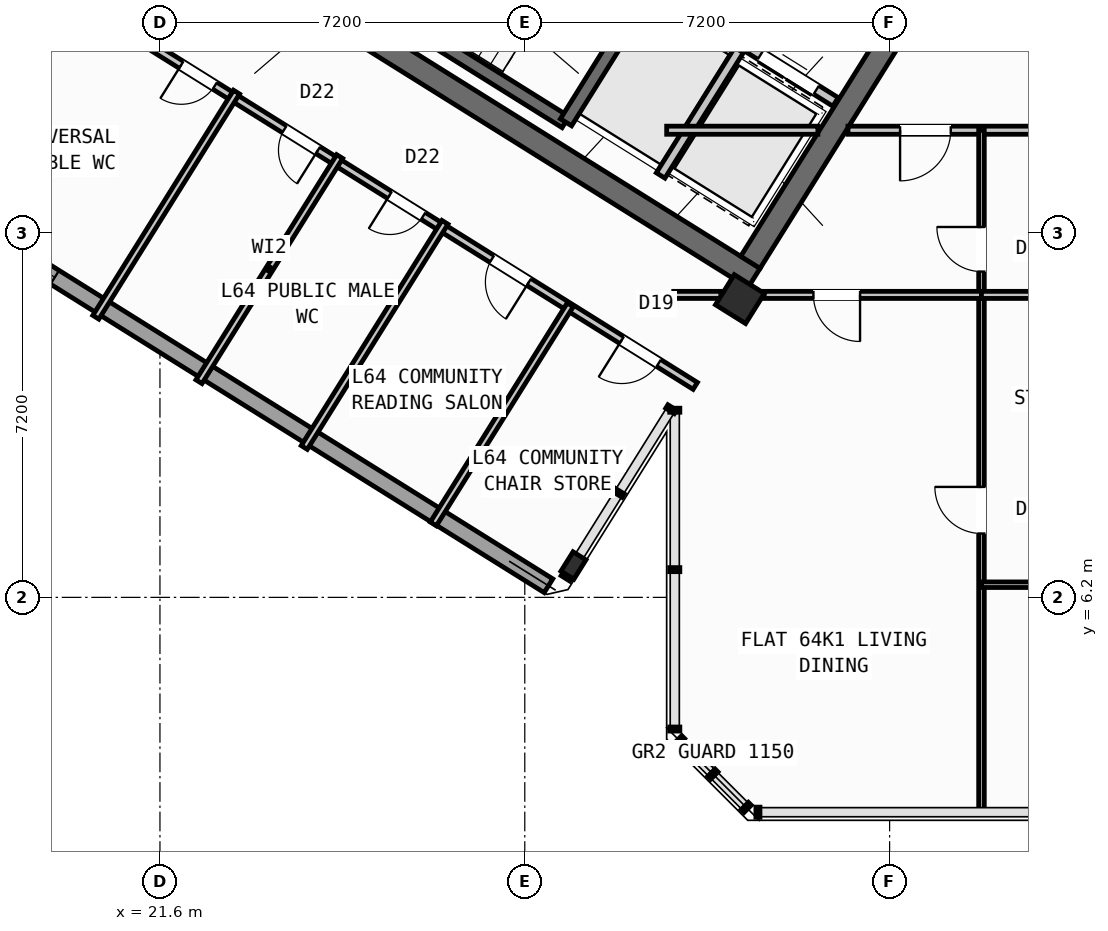
"""IFC4 building model, lengths in metres.
Left out: names, types, materials, properties, quantities, classifications, styles, units other than length and angle.
Written with IfcOpenShell. Run it as: python <this file> out.ifc"""

import sys

from ifc_helpers import new_model, si_unit, direction, frame, frame_2d, origin, origin_2d, place, context, subcontext, project, spatial, rectangle, hollow_rectangle, i_section, extrude, source, transform, mapped, element, fill, save


model = new_model("IFC4")
c1 = context("Model", 3, precision=1e-05, world=origin(), true_north=direction((0.0, 1.0)))
c2 = subcontext(c1, "Body", "Model", "MODEL_VIEW")
j1 = project(units=[si_unit("LENGTHUNIT", "METRE"), si_unit("PLANEANGLEUNIT", "RADIAN")], contexts=[c1])
p1 = place(None, origin())
s1 = spatial("IfcSite", under=j1, at=p1, CompositionType="ELEMENT")
p2 = place(p1, origin())
s2 = spatial("IfcBuilding", under=s1, at=p2, CompositionType="ELEMENT")
p3 = place(p2, frame((0.0, 0.0, 254.7)))
s3 = spatial("IfcBuildingStorey", under=s2, at=p3, CompositionType="ELEMENT", Elevation=254.7)
p4 = place(p3, frame((33.324, 12.503, 0.0), z_axis=(0.0, 0.0, 1.0), x_axis=(-0.848043529849, 0.529926571782, 0.0)))
e1 = element("IfcWall", 1, at=p4, inside=s3, PredefinedType="SHEAR", context=c2, shape_type="SweptSolid", body=[
    extrude(rectangle(XDim=13.04, YDim=0.45, at=frame_2d((6.52, 0.0))), origin(), (0.0, 0.0, 1.0), 4.25),
])
p5 = place(p3, frame((36.683, 18.304, 0.0), z_axis=(0.0, 0.0, 1.0), x_axis=(-0.529904039071, -0.848057609704, 0.0)))
e2 = element("IfcWall", 2, at=p5, inside=s3, PredefinedType="SHEAR", context=c2, shape_type="SweptSolid", body=[
    extrude(rectangle(XDim=6.475, YDim=0.45, at=frame_2d((3.238, 0.0))), origin(), (0.0, 0.0, 1.0), 4.25),
])
m1 = source(origin(), c2, "Body", "SweptSolid", [
    extrude(hollow_rectangle(XDim=0.7, YDim=0.7, WallThickness=0.028, at=origin_2d()), origin(), (0.0, 0.0, 1.0), 4.5),
])
p6 = place(p3, frame((33.046, 12.087, 0.0), z_axis=(0.0, 0.0, 1.0), x_axis=(-0.848048096156, 0.529919264233, 0.0)))
e3 = element("IfcColumn", 3, at=p6, inside=s3, PredefinedType="COLUMN", context=c2, shape_type="MappedRepresentation", body=[
    mapped(m1, transform((0.0, 0.0, 0.0), scale=1.0)),
])
m2 = source(origin(), c2, "Body", "SweptSolid", [
    extrude(i_section(OverallWidth=0.3, OverallDepth=0.45, WebThickness=0.014, FlangeThickness=0.026, at=origin_2d()), origin(), (0.0, 0.0, 1.0), 4.5),
])
p7 = place(p3, frame((29.761, 6.829, 0.0), z_axis=(0.0, 0.0, 1.0), x_axis=(-0.848048096156, 0.529919264233, 0.0)))
e4 = element("IfcColumn", 4, at=p7, inside=s3, PredefinedType="COLUMN", context=c2, shape_type="MappedRepresentation", body=[
    mapped(m2, transform((0.0, 0.0, 0.0), scale=1.0)),
])
p8 = place(p3, frame((29.268, 6.429, 0.0), z_axis=(0.0, 0.0, 1.0), x_axis=(-0.848049971435, 0.529916263149, 0.0)))
e5 = element("IfcWall", 5, at=p8, inside=s3, PredefinedType="STANDARD", context=c2, shape_type="SweptSolid", body=[
    extrude(rectangle(XDim=31.588, YDim=0.32, at=frame_2d((15.794, 0.0))), origin(), (0.0, 0.0, 1.0), 4.25),
])
p9 = place(p8, frame((22.349, 0.0, 0.0)))
e6 = element("IfcOpeningElement", 6, at=p9, cuts=e5, PredefinedType="OPENING", context=c2, shape_type="SweptSolid", body=[
    extrude(rectangle(XDim=1.2, YDim=2.15, at=frame_2d((0.6, 1.075))), frame((0.0, 0.17, 0.0), z_axis=(0.0, -1.0, 0.0), x_axis=(1.0, 0.0, 0.0)), (0.0, 0.0, 1.0), 0.34),
])
p10 = place(p8, frame((11.489, 0.0, 0.7)))
e7 = element("IfcOpeningElement", 7, at=p10, cuts=e5, PredefinedType="OPENING", context=c2, shape_type="SweptSolid", body=[
    extrude(rectangle(XDim=2.6, YDim=2.0, at=frame_2d((1.3, 1.0))), frame((0.0, 0.17, 0.0), z_axis=(0.0, -1.0, 0.0), x_axis=(1.0, 0.0, 0.0)), (0.0, 0.0, 1.0), 0.34),
])
p11 = place(p8, frame((17.881, 0.0, 0.75)))
e8 = element("IfcOpeningElement", 8, at=p11, cuts=e5, PredefinedType="OPENING", context=c2, shape_type="SweptSolid", body=[
    extrude(rectangle(XDim=2.0, YDim=1.95, at=frame_2d((1.0, 0.975))), frame((0.0, 0.17, 0.0), z_axis=(0.0, -1.0, 0.0), x_axis=(1.0, 0.0, 0.0)), (0.0, 0.0, 1.0), 0.34),
])
p12 = place(p8, frame((25.501, 0.0, 0.85)))
e9 = element("IfcOpeningElement", 9, at=p12, cuts=e5, PredefinedType="OPENING", context=c2, shape_type="SweptSolid", body=[
    extrude(rectangle(XDim=1.6, YDim=1.8, at=frame_2d((0.8, 0.9))), frame((0.0, 0.17, 0.0), z_axis=(0.0, -1.0, 0.0), x_axis=(1.0, 0.0, 0.0)), (0.0, 0.0, 1.0), 0.34),
])
p13 = place(p8, frame((28.725, 0.0, 0.85)))
e10 = element("IfcOpeningElement", 10, at=p13, cuts=e5, PredefinedType="OPENING", context=c2, shape_type="SweptSolid", body=[
    extrude(rectangle(XDim=1.6, YDim=1.8, at=frame_2d((0.8, 0.9))), frame((0.0, 0.17, 0.0), z_axis=(0.0, -1.0, 0.0), x_axis=(1.0, 0.0, 0.0)), (0.0, 0.0, 1.0), 0.34),
])
p14 = place(p3, frame((29.605, 15.581, 0.0), z_axis=(0.0, 0.0, 1.0), x_axis=(-0.848036911448, 0.529937163087, 0.0)))
e11 = element("IfcWall", 11, at=p14, inside=s3, PredefinedType="SHEAR", context=c2, shape_type="SweptSolid", body=[
    extrude(rectangle(XDim=7.46, YDim=0.26, at=frame_2d((3.73, 0.0))), origin(), (0.0, 0.0, 1.0), 4.25),
])
p15 = place(p3, frame((31.288, 18.256, 0.0), z_axis=(0.0, 0.0, 1.0), x_axis=(-0.529943379326, -0.848033026897, 0.0)))
e12 = element("IfcWall", 12, at=p15, inside=s3, PredefinedType="SHEAR", context=c2, shape_type="SweptSolid", body=[
    extrude(rectangle(XDim=3.16, YDim=0.26, at=frame_2d((1.58, 0.0))), origin(), (0.0, 0.0, 1.0), 4.25),
])
p16 = place(p3, frame((34.933, 15.978, 0.0), z_axis=(0.0, 0.0, 1.0), x_axis=(-0.848055739377, 0.529907032327, 0.0)))
e13 = element("IfcWall", 13, at=p16, inside=s3, PredefinedType="STANDARD", context=c2, shape_type="SweptSolid", body=[
    extrude(rectangle(XDim=4.298, YDim=0.2, at=frame_2d((2.149, 0.0))), origin(), (0.0, 0.0, 1.0), 4.24),
])
p17 = place(p16, frame((0.448, 0.0, 0.0)))
e14 = element("IfcOpeningElement", 14, at=p17, cuts=e13, PredefinedType="OPENING", context=c2, shape_type="SweptSolid", body=[
    extrude(rectangle(XDim=1.3, YDim=2.2, at=frame_2d((0.65, 1.1))), frame((0.0, 0.11, 0.0), z_axis=(0.0, -1.0, 0.0), x_axis=(1.0, 0.0, 0.0)), (0.0, 0.0, 1.0), 0.22),
])
p18 = place(p16, frame((2.523, 0.0, 0.0)))
e15 = element("IfcOpeningElement", 15, at=p18, cuts=e13, PredefinedType="OPENING", context=c2, shape_type="SweptSolid", body=[
    extrude(rectangle(XDim=1.45, YDim=2.25, at=frame_2d((0.725, 1.125))), frame((0.0, 0.11, 0.0), z_axis=(0.0, -1.0, 0.0), x_axis=(1.0, 0.0, 0.0)), (0.0, 0.0, 1.0), 0.22),
])
p19 = place(p3, frame((33.029, 17.003, 0.0), z_axis=(0.0, 0.0, 1.0), x_axis=(-0.529916267533, -0.848049968695, 0.0)))
e16 = element("IfcWall", 16, at=p19, inside=s3, PredefinedType="STANDARD", context=c2, shape_type="SweptSolid", body=[
    extrude(rectangle(XDim=2.92, YDim=0.2, at=frame_2d((1.46, 0.0))), origin(), (0.0, 0.0, 1.0), 4.24),
])
p20 = place(p3, frame((20.719, 21.44, 0.0), z_axis=(0.0, 0.0, 1.0), x_axis=(-0.529906246318, -0.848056230514, 0.0)))
e17 = element("IfcWall", 17, at=p20, inside=s3, PredefinedType="PARTITIONING", context=c2, shape_type="SweptSolid", body=[
    extrude(rectangle(XDim=8.05, YDim=0.16, at=frame_2d((4.025, 0.0))), origin(), (0.0, 0.0, 1.0), 4.24),
])
p21 = place(p3, frame((32.164, 10.374, 0.0), z_axis=(0.0, 0.0, 1.0), x_axis=(-0.848044107957, 0.529925646633, 0.0)))
e18 = element("IfcWall", 18, at=p21, inside=s3, PredefinedType="PARTITIONING", context=c2, shape_type="SweptSolid", body=[
    extrude(rectangle(XDim=15.57, YDim=0.16, at=frame_2d((7.785, 0.0))), origin(), (0.0, 0.0, 1.0), 4.24),
])
p22 = place(p21, frame((0.85, 0.0, 0.0)))
e19 = element("IfcOpeningElement", 19, at=p22, cuts=e18, PredefinedType="OPENING", context=c2, shape_type="SweptSolid", body=[
    extrude(rectangle(XDim=0.86, YDim=2.05, at=frame_2d((0.43, 1.025))), frame((0.0, 0.09, 0.0), z_axis=(0.0, -1.0, 0.0), x_axis=(1.0, 0.0, 0.0)), (0.0, 0.0, 1.0), 0.18),
])
p23 = place(p21, frame((3.87, 0.0, 0.0)))
e20 = element("IfcOpeningElement", 20, at=p23, cuts=e18, PredefinedType="OPENING", context=c2, shape_type="SweptSolid", body=[
    extrude(rectangle(XDim=0.86, YDim=2.05, at=frame_2d((0.43, 1.025))), frame((0.0, 0.09, 0.0), z_axis=(0.0, -1.0, 0.0), x_axis=(1.0, 0.0, 0.0)), (0.0, 0.0, 1.0), 0.18),
])
p24 = place(p21, frame((6.33, 0.0, 0.0)))
e21 = element("IfcOpeningElement", 21, at=p24, cuts=e18, PredefinedType="OPENING", context=c2, shape_type="SweptSolid", body=[
    extrude(rectangle(XDim=0.78, YDim=2.05, at=frame_2d((0.39, 1.025))), frame((0.0, 0.09, 0.0), z_axis=(0.0, -1.0, 0.0), x_axis=(1.0, 0.0, 0.0)), (0.0, 0.0, 1.0), 0.18),
])
p25 = place(p21, frame((8.78, 0.0, 0.0)))
e22 = element("IfcOpeningElement", 22, at=p25, cuts=e18, PredefinedType="OPENING", context=c2, shape_type="SweptSolid", body=[
    extrude(rectangle(XDim=0.78, YDim=2.05, at=frame_2d((0.39, 1.025))), frame((0.0, 0.09, 0.0), z_axis=(0.0, -1.0, 0.0), x_axis=(1.0, 0.0, 0.0)), (0.0, 0.0, 1.0), 0.18),
])
p26 = place(p21, frame((11.18, 0.0, 0.0)))
e23 = element("IfcOpeningElement", 23, at=p26, cuts=e18, PredefinedType="OPENING", context=c2, shape_type="SweptSolid", body=[
    extrude(rectangle(XDim=0.78, YDim=2.05, at=frame_2d((0.39, 1.025))), frame((0.0, 0.09, 0.0), z_axis=(0.0, -1.0, 0.0), x_axis=(1.0, 0.0, 0.0)), (0.0, 0.0, 1.0), 0.18),
])
p27 = place(p3, frame((29.698, 11.974, 0.0), z_axis=(0.0, 0.0, 1.0), x_axis=(-0.529899964172, -0.848060155868, 0.0)))
e24 = element("IfcWall", 24, at=p27, inside=s3, PredefinedType="PLUMBINGWALL", context=c2, shape_type="SweptSolid", body=[
    extrude(rectangle(XDim=5.1, YDim=0.14, at=frame_2d((2.55, 0.0))), origin(), (0.0, 0.0, 1.0), 4.24),
])
for number, where, z_axis, x_axis in (
    (25, (27.225, 13.602, 0.0), (0.0, 0.0, 1.0), (-0.53, -0.848, 0.0)),
    (26, (25.147, 14.9, 0.0), (0.0, 0.0, 1.0), (-0.53, -0.848, 0.0)),
    (27, (23.111, 16.172, 0.0), (0.0, 0.0, 1.0), (-0.53, -0.848, 0.0)),
):
    element("IfcWall", number, at=place(p3, frame(where, z_axis=z_axis, x_axis=x_axis)), inside=s3, PredefinedType="PLUMBINGWALL", context=c2, shape_type="SweptSolid", body=[
        extrude(rectangle(XDim=5.24, YDim=0.14, at=frame_2d((2.62, 0.0))), origin(), (0.0, 0.0, 1.0), 4.24),
    ])
p28 = place(p3, frame((31.6, 15.42, 0.0), z_axis=(0.0, 0.0, 1.0), x_axis=(1.0, 0.0, 0.0)))
e28 = element("IfcWall", 28, at=p28, inside=s3, PredefinedType="PARTITIONING", context=c2, shape_type="SweptSolid", body=[
    extrude(rectangle(XDim=2.984, YDim=0.16, at=frame_2d((1.492, 0.0))), origin(), (0.0, 0.0, 1.0), 4.24),
])
p29 = place(p3, frame((35.178, 15.42, 0.0), z_axis=(0.0, 0.0, 1.0), x_axis=(1.0, 0.0, 0.0)))
e29 = element("IfcWall", 29, at=p29, inside=s3, PredefinedType="PARTITIONING", context=c2, shape_type="SweptSolid", body=[
    extrude(rectangle(XDim=15.552, YDim=0.16, at=frame_2d((7.776, 0.0))), origin(), (0.0, 0.0, 1.0), 4.24),
])
p30 = place(p29, frame((1.028, 0.0, 0.0)))
e30 = element("IfcOpeningElement", 30, at=p30, cuts=e29, PredefinedType="OPENING", context=c2, shape_type="SweptSolid", body=[
    extrude(rectangle(XDim=1.0, YDim=2.1, at=frame_2d((0.5, 1.05))), frame((0.0, 0.09, 0.0), z_axis=(0.0, -1.0, 0.0), x_axis=(1.0, 0.0, 0.0)), (0.0, 0.0, 1.0), 0.18),
])
p31 = place(p29, frame((8.858, 0.0, 0.0)))
e31 = element("IfcOpeningElement", 31, at=p31, cuts=e29, PredefinedType="OPENING", context=c2, shape_type="SweptSolid", body=[
    extrude(rectangle(XDim=1.0, YDim=2.1, at=frame_2d((0.5, 1.05))), frame((0.0, 0.09, 0.0), z_axis=(0.0, -1.0, 0.0), x_axis=(1.0, 0.0, 0.0)), (0.0, 0.0, 1.0), 0.18),
])
p32 = place(p3, frame((37.813, 1.96, 0.0), z_axis=(0.0, 0.0, 1.0), x_axis=(0.0, 1.0, 0.0)))
e32 = element("IfcWall", 32, at=p32, inside=s3, PredefinedType="PARTITIONING", context=c2, shape_type="SweptSolid", body=[
    extrude(rectangle(XDim=13.46, YDim=0.11, at=frame_2d((6.73, 0.0))), origin(), (0.0, 0.0, 1.0), 4.24),
])
p33 = place(p32, frame((5.5, 0.0, 0.0)))
e33 = element("IfcOpeningElement", 33, at=p33, cuts=e32, PredefinedType="OPENING", context=c2, shape_type="SweptSolid", body=[
    extrude(rectangle(XDim=0.92, YDim=2.08, at=frame_2d((0.46, 1.04))), frame((0.0, 0.065, 0.0), z_axis=(0.0, -1.0, 0.0), x_axis=(1.0, 0.0, 0.0)), (0.0, 0.0, 1.0), 0.13),
])
p34 = place(p32, frame((10.67, 0.0, 0.0)))
e34 = element("IfcOpeningElement", 34, at=p34, cuts=e32, PredefinedType="OPENING", context=c2, shape_type="SweptSolid", body=[
    extrude(rectangle(XDim=0.88, YDim=2.08, at=frame_2d((0.44, 1.04))), frame((0.0, 0.065, 0.0), z_axis=(0.0, -1.0, 0.0), x_axis=(1.0, 0.0, 0.0)), (0.0, 0.0, 1.0), 0.13),
])
p35 = place(p3, frame((31.74, 12.17, 0.0), z_axis=(0.0, 0.0, 1.0), x_axis=(1.0, 0.0, 0.0)))
e35 = element("IfcWall", 35, at=p35, inside=s3, PredefinedType="PLUMBINGWALL", context=c2, shape_type="SweptSolid", body=[
    extrude(rectangle(XDim=0.931, YDim=0.14, at=frame_2d((0.466, 0.0))), origin(), (0.0, 0.0, 1.0), 4.24),
])
p36 = place(p3, frame((33.525, 12.17, 0.0), z_axis=(0.0, 0.0, 1.0), x_axis=(1.0, 0.0, 0.0)))
e36 = element("IfcWall", 36, at=p36, inside=s3, PredefinedType="PLUMBINGWALL", context=c2, shape_type="SweptSolid", body=[
    extrude(rectangle(XDim=4.288, YDim=0.14, at=frame_2d((2.144, 0.0))), origin(), (0.0, 0.0, 1.0), 3.425),
])
p37 = place(p36, frame((0.972, 0.0, 0.0)))
e37 = element("IfcOpeningElement", 37, at=p37, cuts=e36, PredefinedType="OPENING", context=c2, shape_type="SweptSolid", body=[
    extrude(rectangle(XDim=0.92, YDim=2.08, at=frame_2d((0.46, 1.04))), frame((0.0, 0.08, 0.0), z_axis=(0.0, -1.0, 0.0), x_axis=(1.0, 0.0, 0.0)), (0.0, 0.0, 1.0), 0.16),
])
p38 = place(p3, frame((37.813, 12.17, 0.0), z_axis=(0.0, 0.0, 1.0), x_axis=(1.0, 0.0, 0.0)))
e38 = element("IfcWall", 38, at=p38, inside=s3, PredefinedType="PLUMBINGWALL", context=c2, shape_type="SweptSolid", body=[
    extrude(rectangle(XDim=4.137, YDim=0.14, at=frame_2d((2.068, 0.0))), origin(), (0.0, 0.0, 1.0), 3.425),
])
p39 = place(p3, frame((37.813, 6.45, 0.0), z_axis=(0.0, 0.0, 1.0), x_axis=(1.0, 0.0, 0.0)))
e39 = element("IfcWall", 39, at=p39, inside=s3, PredefinedType="PARTITIONING", context=c2, shape_type="SweptSolid", body=[
    extrude(rectangle(XDim=4.137, YDim=0.11, at=frame_2d((2.068, 0.0))), origin(), (0.0, 0.0, 1.0), 4.24),
])
p40 = place(p39, frame((1.608, 0.0, 0.0)))
e40 = element("IfcOpeningElement", 40, at=p40, cuts=e39, PredefinedType="OPENING", context=c2, shape_type="SweptSolid", body=[
    extrude(rectangle(XDim=0.92, YDim=2.08, at=frame_2d((0.46, 1.04))), frame((0.0, 0.065, 0.0), z_axis=(0.0, -1.0, 0.0), x_axis=(1.0, 0.0, 0.0)), (0.0, 0.0, 1.0), 0.13),
])
m3 = source(origin(), c2, "Body", "SweptSolid", [
    extrude(rectangle(XDim=2.6, YDim=2.0, at=frame_2d((1.3, 1.0))), frame((0.0, 0.03, 0.0), z_axis=(0.0, -1.0, 0.0), x_axis=(1.0, 0.0, 0.0)), (0.0, 0.0, 1.0), 0.06),
])
p41 = place(p10, origin())
e41 = element("IfcWindow", 41, at=p41, inside=s3, PartitioningType="SINGLE_PANEL", PredefinedType="WINDOW", context=c2, shape_type="MappedRepresentation", body=[
    mapped(m3, transform((0.0, 0.0, 0.0), scale=1.0)),
])
fill(e7, e41)
m4 = source(origin(), c2, "Body", "SweptSolid", [
    extrude(rectangle(XDim=1.3, YDim=2.2, at=frame_2d((0.65, 1.1))), frame((0.0, 0.025, 0.0), z_axis=(0.0, -1.0, 0.0), x_axis=(1.0, 0.0, 0.0)), (0.0, 0.0, 1.0), 0.05),
])
p42 = place(p17, origin())
e42 = element("IfcDoor", 42, at=p42, inside=s3, OperationType="DOUBLE_DOOR_SLIDING", PredefinedType="DOOR", context=c2, shape_type="MappedRepresentation", body=[
    mapped(m4, transform((0.0, 0.0, 0.0), scale=1.0)),
])
fill(e14, e42)
m5 = source(origin(), c2, "Body", "SweptSolid", [
    extrude(rectangle(XDim=0.86, YDim=2.05, at=frame_2d((0.43, 1.025))), frame((0.0, 0.025, 0.0), z_axis=(0.0, -1.0, 0.0), x_axis=(1.0, 0.0, 0.0)), (0.0, 0.0, 1.0), 0.05),
])
p43 = place(p22, origin())
e43 = element("IfcDoor", 43, at=p43, inside=s3, OperationType="SINGLE_SWING_RIGHT", PredefinedType="DOOR", context=c2, shape_type="MappedRepresentation", body=[
    mapped(m5, transform((0.0, 0.0, 0.0), scale=1.0)),
])
fill(e19, e43)
p44 = place(p23, origin())
e44 = element("IfcDoor", 44, at=p44, inside=s3, OperationType="SINGLE_SWING_LEFT", PredefinedType="DOOR", context=c2, shape_type="MappedRepresentation", body=[
    mapped(m5, transform((0.0, 0.0, 0.0), scale=1.0)),
])
fill(e20, e44)
m6 = source(origin(), c2, "Body", "SweptSolid", [
    extrude(rectangle(XDim=0.78, YDim=2.05, at=frame_2d((0.39, 1.025))), frame((0.0, 0.025, 0.0), z_axis=(0.0, -1.0, 0.0), x_axis=(1.0, 0.0, 0.0)), (0.0, 0.0, 1.0), 0.05),
])
p45 = place(p24, origin())
e45 = element("IfcDoor", 45, at=p45, inside=s3, OperationType="SINGLE_SWING_RIGHT", PredefinedType="DOOR", context=c2, shape_type="MappedRepresentation", body=[
    mapped(m6, transform((0.0, 0.0, 0.0), scale=1.0)),
])
fill(e21, e45)
p46 = place(p25, origin())
e46 = element("IfcDoor", 46, at=p46, inside=s3, OperationType="SINGLE_SWING_LEFT", PredefinedType="DOOR", context=c2, shape_type="MappedRepresentation", body=[
    mapped(m6, transform((0.0, 0.0, 0.0), scale=1.0)),
])
fill(e22, e46)
p47 = place(p26, origin())
e47 = element("IfcDoor", 47, at=p47, inside=s3, OperationType="SINGLE_SWING_RIGHT", PredefinedType="DOOR", context=c2, shape_type="MappedRepresentation", body=[
    mapped(m6, transform((0.0, 0.0, 0.0), scale=1.0)),
])
fill(e23, e47)
m7 = source(origin(), c2, "Body", "SweptSolid", [
    extrude(rectangle(XDim=0.92, YDim=2.08, at=frame_2d((0.46, 1.04))), frame((0.0, 0.025, 0.0), z_axis=(0.0, -1.0, 0.0), x_axis=(1.0, 0.0, 0.0)), (0.0, 0.0, 1.0), 0.05),
])
p48 = place(p33, origin())
e48 = element("IfcDoor", 48, at=p48, inside=s3, OperationType="SINGLE_SWING_RIGHT", PredefinedType="DOOR", context=c2, shape_type="MappedRepresentation", body=[
    mapped(m7, transform((0.0, 0.0, 0.0), scale=1.0)),
])
fill(e33, e48)
m8 = source(origin(), c2, "Body", "SweptSolid", [
    extrude(rectangle(XDim=1.0, YDim=2.1, at=frame_2d((0.5, 1.05))), frame((0.0, 0.025, 0.0), z_axis=(0.0, -1.0, 0.0), x_axis=(1.0, 0.0, 0.0)), (0.0, 0.0, 1.0), 0.05),
])
p49 = place(p30, frame((1.0, 0.0, 0.0), z_axis=(0.0, 0.0, 1.0), x_axis=(-1.0, 0.0, 0.0)))
e49 = element("IfcDoor", 49, at=p49, inside=s3, OperationType="SINGLE_SWING_RIGHT", PredefinedType="DOOR", context=c2, shape_type="MappedRepresentation", body=[
    mapped(m8, transform((0.0, 0.0, 0.0), scale=1.0)),
])
fill(e30, e49)
p50 = place(p37, frame((0.92, 0.0, 0.0), z_axis=(0.0, 0.0, 1.0), x_axis=(-1.0, 0.0, 0.0)))
e50 = element("IfcDoor", 50, at=p50, inside=s3, OperationType="SINGLE_SWING_LEFT", PredefinedType="DOOR", context=c2, shape_type="MappedRepresentation", body=[
    mapped(m7, transform((0.0, 0.0, 0.0), scale=1.0)),
])
fill(e37, e50)
m9 = source(origin(), c2, "Body", "SweptSolid", [
    extrude(rectangle(XDim=0.88, YDim=2.08, at=frame_2d((0.44, 1.04))), frame((0.0, 0.025, 0.0), z_axis=(0.0, -1.0, 0.0), x_axis=(1.0, 0.0, 0.0)), (0.0, 0.0, 1.0), 0.05),
])
p51 = place(p34, origin())
e51 = element("IfcDoor", 51, at=p51, inside=s3, OperationType="SINGLE_SWING_RIGHT", PredefinedType="DOOR", context=c2, shape_type="MappedRepresentation", body=[
    mapped(m9, transform((0.0, 0.0, 0.0), scale=1.0)),
])
fill(e34, e51)
save(model, sys.argv[1])
